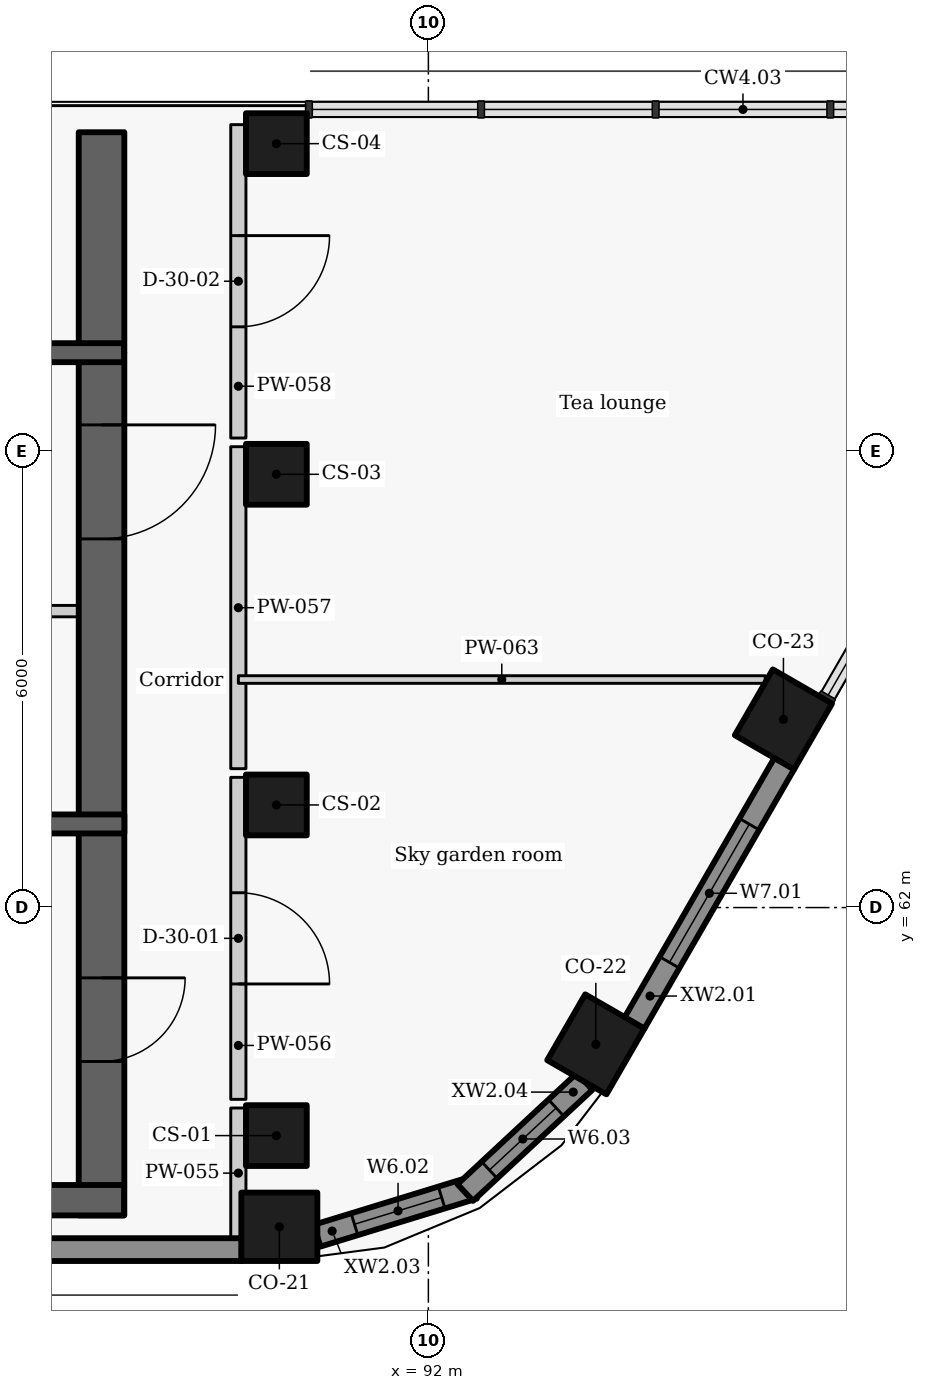
"""IFC4 building model, lengths in metres.
Left out: names, types, materials, properties, quantities, classifications, styles, units other than length and angle.
Written with IfcOpenShell. Run it as: python <this file> out.ifc"""

import sys

from ifc_helpers import new_model, si_unit, direction, frame, frame_2d, origin, origin_2d, place, context, subcontext, project, spatial, rectangle, extrude, element, fill, save


model = new_model("IFC4")
c1 = context("Model", 3, precision=1e-05, world=origin(), true_north=direction((0.0, 1.0)))
c2 = subcontext(c1, "Body", "Model", "MODEL_VIEW")
j1 = project(units=[si_unit("LENGTHUNIT", "METRE"), si_unit("PLANEANGLEUNIT", "RADIAN")], contexts=[c1])
p1 = place(None, origin())
s1 = spatial("IfcSite", under=j1, at=p1, CompositionType="ELEMENT")
p2 = place(p1, origin())
s2 = spatial("IfcBuilding", under=s1, at=p2, CompositionType="ELEMENT")
p3 = place(p2, frame((0.0, 0.0, 279.6)))
s3 = spatial("IfcBuildingStorey", under=s2, at=p3, CompositionType="ELEMENT", Elevation=279.6)
for number, where, z_axis, x_axis in (
    (1, (90.04, 57.8, 0.0), (0.0, 0.0, 1.0), (1.0, 0.0, 0.0)),
    (2, (94.203, 60.2, 0.0), (0.0, 0.0, 1.0), (0.5, 0.866, 0.0)),
    (3, (96.671, 64.475, 0.0), (0.0, 0.0, 1.0), (0.5, 0.866, 0.0)),
):
    element("IfcColumn", number, at=place(p3, frame(where, z_axis=z_axis, x_axis=x_axis)), inside=s3, PredefinedType="COLUMN", context=c2, shape_type="SweptSolid", body=[
        extrude(rectangle(XDim=1.0, YDim=0.9, at=origin_2d()), origin(), (0.0, 0.0, 1.0), 3.6),
    ])
for number, where, z_axis, x_axis in (
    (4, (90.0, 59.0, 0.0), (0.0, 0.0, 1.0), (0.0, 1.0, 0.0)),
    (5, (90.0, 63.35, 0.0), (0.0, 0.0, 1.0), (0.0, 1.0, 0.0)),
    (6, (90.0, 67.7, 0.0), (0.0, 0.0, 1.0), (0.0, 1.0, 0.0)),
    (7, (90.0, 72.05, 0.0), (0.0, 0.0, 1.0), (0.0, 1.0, 0.0)),
):
    element("IfcColumn", number, at=place(p3, frame(where, z_axis=z_axis, x_axis=x_axis)), inside=s3, PredefinedType="COLUMN", context=c2, shape_type="SweptSolid", body=[
        extrude(rectangle(XDim=0.8, YDim=0.8, at=origin_2d()), origin(), (0.0, 0.0, 1.0), 3.6),
    ])
p4 = place(p3, frame((94.711, 60.48, 0.0), z_axis=(0.0, 0.0, 1.0), x_axis=(0.499986771468, 0.866033041146, 0.0)))
e8 = element("IfcWall", 8, at=p4, inside=s3, PredefinedType="SOLIDWALL", context=c2, shape_type="SweptSolid", body=[
    extrude(rectangle(XDim=3.944, YDim=0.3, at=frame_2d((1.972, 0.0))), origin(), (0.0, 0.0, 1.0), 2.725),
])
p5 = place(p4, frame((0.922, 0.0, 0.9)))
e9 = element("IfcOpeningElement", 9, at=p5, cuts=e8, PredefinedType="OPENING", context=c2, shape_type="SweptSolid", body=[
    extrude(rectangle(XDim=2.1, YDim=1.1, at=frame_2d((1.05, 0.55))), frame((0.0, 0.16, 0.0), z_axis=(0.0, -1.0, 0.0), x_axis=(1.0, 0.0, 0.0)), (0.0, 0.0, 1.0), 0.32),
])
p6 = place(p3, frame((70.451, 57.5, 0.0), z_axis=(0.0, 0.0, 1.0), x_axis=(1.0, 0.0, 0.0)))
e10 = element("IfcWall", 10, at=p6, inside=s3, PredefinedType="SOLIDWALL", context=c2, shape_type="SweptSolid", body=[
    extrude(rectangle(XDim=19.093, YDim=0.3, at=frame_2d((9.546, 0.0))), origin(), (0.0, 0.0, 1.0), 2.725),
])
p7 = place(p3, frame((90.536, 57.683, 0.0), z_axis=(0.0, 0.0, 1.0), x_axis=(0.956094906027, 0.293057213987, 0.0)))
e11 = element("IfcWall", 11, at=p7, inside=s3, PredefinedType="SOLIDWALL", context=c2, shape_type="SweptSolid", body=[
    extrude(rectangle(XDim=2.152, YDim=0.3, at=frame_2d((1.076, 0.0))), origin(), (0.0, 0.0, 1.0), 2.725),
])
p8 = place(p7, frame((0.514, 0.0, 0.9)))
e12 = element("IfcOpeningElement", 12, at=p8, cuts=e11, PredefinedType="OPENING", context=c2, shape_type="SweptSolid", body=[
    extrude(rectangle(XDim=1.2, YDim=1.1, at=frame_2d((0.6, 0.55))), frame((0.0, 0.16, 0.0), z_axis=(0.0, -1.0, 0.0), x_axis=(1.0, 0.0, 0.0)), (0.0, 0.0, 1.0), 0.32),
])
p9 = place(p3, frame((92.485, 58.25, 0.0), z_axis=(0.0, 0.0, 1.0), x_axis=(0.732075899412, 0.681223074697, 0.0)))
e13 = element("IfcWall", 13, at=p9, inside=s3, PredefinedType="SOLIDWALL", context=c2, shape_type="SweptSolid", body=[
    extrude(rectangle(XDim=2.146, YDim=0.3, at=frame_2d((1.073, 0.0))), origin(), (0.0, 0.0, 1.0), 2.725),
])
p10 = place(p9, frame((0.435, 0.0, 0.9)))
e14 = element("IfcOpeningElement", 14, at=p10, cuts=e13, PredefinedType="OPENING", context=c2, shape_type="SweptSolid", body=[
    extrude(rectangle(XDim=1.2, YDim=1.1, at=frame_2d((0.6, 0.55))), frame((0.0, 0.16, 0.0), z_axis=(0.0, -1.0, 0.0), x_axis=(1.0, 0.0, 0.0)), (0.0, 0.0, 1.0), 0.32),
])
p11 = place(p3, frame((88.0, 65.9, 0.0), z_axis=(0.0, 0.0, 1.0), x_axis=(-1.0, 0.0, 0.0)))
e15 = element("IfcWall", 15, at=p11, inside=s3, PredefinedType="PARTITIONING", context=c2, shape_type="SweptSolid", body=[
    extrude(rectangle(XDim=2.603, YDim=0.15, at=frame_2d((1.302, 0.0))), origin(), (0.0, 0.0, 1.0), 3.325),
])
p12 = place(p11, frame((1.175, 0.0, 0.0)))
e16 = element("IfcOpeningElement", 16, at=p12, cuts=e15, PredefinedType="OPENING", context=c2, shape_type="SweptSolid", body=[
    extrude(rectangle(XDim=0.9, YDim=2.1, at=frame_2d((0.45, 1.05))), frame((0.0, 0.085, 0.0), z_axis=(0.0, -1.0, 0.0), x_axis=(1.0, 0.0, 0.0)), (0.0, 0.0, 1.0), 0.17),
])
p13 = place(p3, frame((87.7, 69.3, -0.275), z_axis=(0.0, 0.0, 1.0), x_axis=(0.0, -1.0, 0.0)))
e17 = element("IfcWall", 17, at=p13, inside=s3, PredefinedType="SHEAR", context=c2, shape_type="SweptSolid", body=[
    extrude(rectangle(XDim=11.35, YDim=0.6, at=frame_2d((5.675, 0.0))), origin(), (0.0, 0.0, 1.0), 3.6),
])
p14 = place(p13, frame((0.95, 0.0, 0.275)))
e18 = element("IfcOpeningElement", 18, at=p14, cuts=e17, PredefinedType="OPENING", context=c2, shape_type="SweptSolid", body=[
    extrude(rectangle(XDim=1.5, YDim=2.1, at=frame_2d((0.75, 1.05))), frame((0.0, 0.31, 0.0), z_axis=(0.0, -1.0, 0.0), x_axis=(1.0, 0.0, 0.0)), (0.0, 0.0, 1.0), 0.62),
])
p15 = place(p13, frame((8.225, 0.0, 0.275)))
e19 = element("IfcOpeningElement", 19, at=p15, cuts=e17, PredefinedType="OPENING", context=c2, shape_type="SweptSolid", body=[
    extrude(rectangle(XDim=1.1, YDim=2.1, at=frame_2d((0.55, 1.05))), frame((0.0, 0.31, 0.0), z_axis=(0.0, -1.0, 0.0), x_axis=(1.0, 0.0, 0.0)), (0.0, 0.0, 1.0), 0.62),
])
p16 = place(p3, frame((80.547, 63.1, -0.275), z_axis=(0.0, 0.0, 1.0), x_axis=(1.0, 0.0, 0.0)))
e20 = element("IfcWall", 20, at=p16, inside=s3, PredefinedType="SHEAR", context=c2, shape_type="SweptSolid", body=[
    extrude(rectangle(XDim=7.453, YDim=0.25, at=frame_2d((3.727, 0.0))), origin(), (0.0, 0.0, 1.0), 3.6),
])
p17 = place(p16, frame((3.302, 0.0, 0.275)))
e21 = element("IfcOpeningElement", 21, at=p17, cuts=e20, PredefinedType="OPENING", context=c2, shape_type="SweptSolid", body=[
    extrude(rectangle(XDim=1.1, YDim=2.1, at=frame_2d((0.55, 1.05))), frame((0.0, 0.135, 0.0), z_axis=(0.0, -1.0, 0.0), x_axis=(1.0, 0.0, 0.0)), (0.0, 0.0, 1.0), 0.27),
])
p18 = place(p3, frame((89.5, 57.65, 0.0), z_axis=(0.0, 0.0, 1.0), x_axis=(0.0, 1.0, 0.0)))
e22 = element("IfcWall", 22, at=p18, inside=s3, PredefinedType="PARTITIONING", context=c2, shape_type="SweptSolid", body=[
    extrude(rectangle(XDim=1.713, YDim=0.2, at=frame_2d((0.856, 0.0))), origin(), (0.0, 0.0, 1.0), 3.325),
])
p19 = place(p3, frame((89.5, 63.713, 0.0), z_axis=(0.0, 0.0, 1.0), x_axis=(0.0, -1.0, 0.0)))
e23 = element("IfcWall", 23, at=p19, inside=s3, PredefinedType="PARTITIONING", context=c2, shape_type="SweptSolid", body=[
    extrude(rectangle(XDim=4.236, YDim=0.2, at=frame_2d((2.118, 0.0))), origin(), (0.0, 0.0, 1.0), 3.325),
])
p20 = place(p19, frame((1.518, 0.0, 0.0)))
e24 = element("IfcOpeningElement", 24, at=p20, cuts=e23, PredefinedType="OPENING", context=c2, shape_type="SweptSolid", body=[
    extrude(rectangle(XDim=1.2, YDim=2.1, at=frame_2d((0.6, 1.05))), frame((0.0, 0.11, 0.0), z_axis=(0.0, -1.0, 0.0), x_axis=(1.0, 0.0, 0.0)), (0.0, 0.0, 1.0), 0.22),
])
p21 = place(p3, frame((89.5, 63.827, 0.0), z_axis=(0.0, 0.0, 1.0), x_axis=(0.0, 1.0, 0.0)))
e25 = element("IfcWall", 25, at=p21, inside=s3, PredefinedType="PARTITIONING", context=c2, shape_type="SweptSolid", body=[
    extrude(rectangle(XDim=4.236, YDim=0.2, at=frame_2d((2.118, 0.0))), origin(), (0.0, 0.0, 1.0), 3.325),
])
p22 = place(p3, frame((89.5, 72.3, 0.0), z_axis=(0.0, 0.0, 1.0), x_axis=(0.0, -1.0, 0.0)))
e26 = element("IfcWall", 26, at=p22, inside=s3, PredefinedType="PARTITIONING", context=c2, shape_type="SweptSolid", body=[
    extrude(rectangle(XDim=4.123, YDim=0.2, at=frame_2d((2.062, 0.0))), origin(), (0.0, 0.0, 1.0), 3.325),
])
p23 = place(p22, frame((1.46, 0.0, 0.0)))
e27 = element("IfcOpeningElement", 27, at=p23, cuts=e26, PredefinedType="OPENING", context=c2, shape_type="SweptSolid", body=[
    extrude(rectangle(XDim=1.2, YDim=2.1, at=frame_2d((0.6, 1.05))), frame((0.0, 0.11, 0.0), z_axis=(0.0, -1.0, 0.0), x_axis=(1.0, 0.0, 0.0)), (0.0, 0.0, 1.0), 0.22),
])
p24 = place(p3, frame((89.5, 65.0, 0.0), z_axis=(0.0, 0.0, 1.0), x_axis=(1.0, 0.0, 0.0)))
e28 = element("IfcWall", 28, at=p24, inside=s3, PredefinedType="PARTITIONING", context=c2, shape_type="SweptSolid", body=[
    extrude(rectangle(XDim=6.931, YDim=0.1, at=frame_2d((3.466, 0.0))), origin(), (0.0, 0.0, 1.0), 2.805),
])
p25 = place(p3, frame((87.7, 69.304, -0.275), z_axis=(0.0, 0.0, 1.0), x_axis=(0.0, 1.0, 0.0)))
e29 = element("IfcWall", 29, at=p25, inside=s3, PredefinedType="SHEAR", context=c2, shape_type="SweptSolid", body=[
    extrude(rectangle(XDim=2.896, YDim=0.6, at=frame_2d((1.448, 0.0))), origin(), (0.0, 0.0, 1.0), 3.6),
])
p26 = place(p3, frame((85.404, 69.3, -0.275), z_axis=(0.0, 0.0, 1.0), x_axis=(1.0, 0.0, 0.0)))
e30 = element("IfcWall", 30, at=p26, inside=s3, PredefinedType="SHEAR", context=c2, shape_type="SweptSolid", body=[
    extrude(rectangle(XDim=2.592, YDim=0.25, at=frame_2d((1.296, 0.0))), origin(), (0.0, 0.0, 1.0), 3.6),
])
p27 = place(p3, frame((72.004, 58.15, -0.275), z_axis=(0.0, 0.0, 1.0), x_axis=(1.0, 0.0, 0.0)))
e31 = element("IfcWall", 31, at=p27, inside=s3, PredefinedType="SHEAR", context=c2, shape_type="SweptSolid", body=[
    extrude(rectangle(XDim=15.992, YDim=0.4, at=frame_2d((7.996, 0.0))), origin(), (0.0, 0.0, 1.0), 3.6),
])
p28 = place(p5, origin())
e32 = element("IfcWindow", 32, at=p28, inside=s3, PartitioningType="SINGLE_PANEL", PredefinedType="WINDOW", context=c2, shape_type="SweptSolid", body=[
    extrude(rectangle(XDim=2.1, YDim=1.1, at=frame_2d((1.05, 0.55))), frame((0.0, 0.03, 0.0), z_axis=(0.0, -1.0, 0.0), x_axis=(1.0, 0.0, 0.0)), (0.0, 0.0, 1.0), 0.06),
])
fill(e9, e32)
p29 = place(p8, origin())
e33 = element("IfcWindow", 33, at=p29, inside=s3, PartitioningType="SINGLE_PANEL", PredefinedType="WINDOW", context=c2, shape_type="SweptSolid", body=[
    extrude(rectangle(XDim=1.2, YDim=1.1, at=frame_2d((0.6, 0.55))), frame((0.0, 0.03, 0.0), z_axis=(0.0, -1.0, 0.0), x_axis=(1.0, 0.0, 0.0)), (0.0, 0.0, 1.0), 0.06),
])
fill(e12, e33)
p30 = place(p10, origin())
e34 = element("IfcWindow", 34, at=p30, inside=s3, PartitioningType="SINGLE_PANEL", PredefinedType="WINDOW", context=c2, shape_type="SweptSolid", body=[
    extrude(rectangle(XDim=1.2, YDim=1.1, at=frame_2d((0.6, 0.55))), frame((0.0, 0.03, 0.0), z_axis=(0.0, -1.0, 0.0), x_axis=(1.0, 0.0, 0.0)), (0.0, 0.0, 1.0), 0.06),
])
fill(e14, e34)
p31 = place(p20, origin())
e35 = element("IfcDoor", 35, at=p31, inside=s3, OperationType="SINGLE_SWING_RIGHT", PredefinedType="DOOR", context=c2, shape_type="SweptSolid", body=[
    extrude(rectangle(XDim=1.2, YDim=2.1, at=frame_2d((0.6, 1.05))), frame((0.0, 0.025, 0.0), z_axis=(0.0, -1.0, 0.0), x_axis=(1.0, 0.0, 0.0)), (0.0, 0.0, 1.0), 0.05),
])
fill(e24, e35)
p32 = place(p23, origin())
e36 = element("IfcDoor", 36, at=p32, inside=s3, OperationType="SINGLE_SWING_LEFT", PredefinedType="DOOR", context=c2, shape_type="SweptSolid", body=[
    extrude(rectangle(XDim=1.2, YDim=2.1, at=frame_2d((0.6, 1.05))), frame((0.0, 0.025, 0.0), z_axis=(0.0, -1.0, 0.0), x_axis=(1.0, 0.0, 0.0)), (0.0, 0.0, 1.0), 0.05),
])
fill(e27, e36)
p33 = place(p14, origin())
e37 = element("IfcDoor", 37, at=p33, inside=s3, OperationType="DOUBLE_DOOR_SINGLE_SWING", PredefinedType="DOOR", context=c2, shape_type="SweptSolid", body=[
    extrude(rectangle(XDim=1.5, YDim=2.1, at=frame_2d((0.75, 1.05))), frame((0.0, 0.025, 0.0), z_axis=(0.0, -1.0, 0.0), x_axis=(1.0, 0.0, 0.0)), (0.0, 0.0, 1.0), 0.05),
])
fill(e18, e37)
p34 = place(p15, origin())
e38 = element("IfcDoor", 38, at=p34, inside=s3, OperationType="SINGLE_SWING_LEFT", PredefinedType="DOOR", context=c2, shape_type="SweptSolid", body=[
    extrude(rectangle(XDim=1.1, YDim=2.1, at=frame_2d((0.55, 1.05))), frame((0.0, 0.025, 0.0), z_axis=(0.0, -1.0, 0.0), x_axis=(1.0, 0.0, 0.0)), (0.0, 0.0, 1.0), 0.05),
])
fill(e19, e38)
save(model, sys.argv[1])
